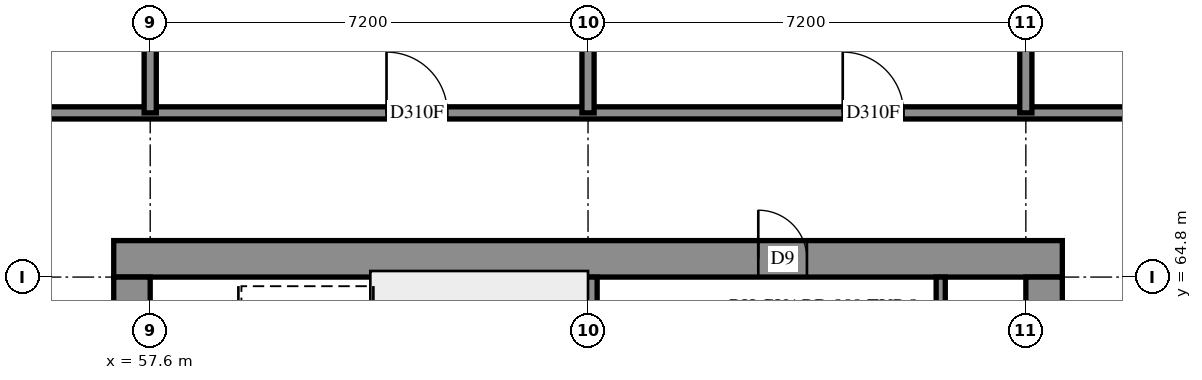
"""IFC4 building model, lengths in metres.
Left out: names, types, materials, properties, quantities, classifications, styles, units other than length and angle.
Written with IfcOpenShell. Run it as: python <this file> out.ifc"""

import sys

from ifc_helpers import new_model, si_unit, direction, frame, frame_2d, origin, place, context, subcontext, project, spatial, rectangle, extrude, element, fill, save


model = new_model("IFC4")
c1 = context("Model", 3, precision=1e-05, world=origin(), true_north=direction((0.0, 1.0)))
c2 = subcontext(c1, "Body", "Model", "MODEL_VIEW")
j1 = project(units=[si_unit("LENGTHUNIT", "METRE"), si_unit("PLANEANGLEUNIT", "RADIAN")], contexts=[c1])
p1 = place(None, origin())
s1 = spatial("IfcSite", under=j1, at=p1, CompositionType="ELEMENT")
p2 = place(p1, origin())
s2 = spatial("IfcBuilding", under=s1, at=p2, CompositionType="ELEMENT")
p3 = place(p2, frame((0.0, 0.0, 142.2)))
s3 = spatial("IfcBuildingStorey", under=s2, at=p3, CompositionType="ELEMENT", Elevation=142.2)
p4 = place(p3, frame((57.0, 65.1, -0.3), z_axis=(0.0, 0.0, 1.0), x_axis=(1.0, 0.0, 0.0)))
e1 = element("IfcWall", 1, at=p4, inside=s3, PredefinedType="SHEAR", context=c2, shape_type="SweptSolid", body=[
    extrude(rectangle(XDim=15.6, YDim=0.6, at=frame_2d((7.8, 0.0))), origin(), (0.0, 0.0, 1.0), 2.7),
])
p5 = place(p4, frame((10.6, 0.0, 0.3)))
e2 = element("IfcOpeningElement", 2, at=p5, cuts=e1, PredefinedType="OPENING", context=c2, shape_type="SweptSolid", body=[
    extrude(rectangle(XDim=0.8, YDim=2.1, at=frame_2d((0.4, 1.05))), frame((0.0, 0.31, 0.0), z_axis=(0.0, -1.0, 0.0), x_axis=(1.0, 0.0, 0.0)), (0.0, 0.0, 1.0), 0.62),
])
p6 = place(p3, frame((57.3, 50.4, -0.3), z_axis=(0.0, 0.0, 1.0), x_axis=(0.0, 1.0, 0.0)))
e3 = element("IfcWall", 3, at=p6, inside=s3, PredefinedType="SHEAR", context=c2, shape_type="SweptSolid", body=[
    extrude(rectangle(XDim=14.4, YDim=0.6, at=frame_2d((7.2, 0.0))), origin(), (0.0, 0.0, 1.0), 2.7),
])
p7 = place(p6, frame((4.55, 0.0, 0.3)))
e4 = element("IfcOpeningElement", 4, at=p7, cuts=e3, PredefinedType="OPENING", context=c2, shape_type="SweptSolid", body=[
    extrude(rectangle(XDim=1.1, YDim=2.1, at=frame_2d((0.55, 1.05))), frame((0.0, 0.31, 0.0), z_axis=(0.0, -1.0, 0.0), x_axis=(1.0, 0.0, 0.0)), (0.0, 0.0, 1.0), 0.62),
])
p8 = place(p6, frame((11.35, 0.0, 0.3)))
e5 = element("IfcOpeningElement", 5, at=p8, cuts=e3, PredefinedType="OPENING", context=c2, shape_type="SweptSolid", body=[
    extrude(rectangle(XDim=1.1, YDim=2.1, at=frame_2d((0.55, 1.05))), frame((0.0, 0.31, 0.0), z_axis=(0.0, -1.0, 0.0), x_axis=(1.0, 0.0, 0.0)), (0.0, 0.0, 1.0), 0.62),
])
p9 = place(p3, frame((72.3, 50.4, -0.3), z_axis=(0.0, 0.0, 1.0), x_axis=(0.0, 1.0, 0.0)))
e6 = element("IfcWall", 6, at=p9, inside=s3, PredefinedType="SHEAR", context=c2, shape_type="SweptSolid", body=[
    extrude(rectangle(XDim=14.4, YDim=0.6, at=frame_2d((7.2, 0.0))), origin(), (0.0, 0.0, 1.0), 2.7),
])
p10 = place(p9, frame((4.55, 0.0, 0.3)))
e7 = element("IfcOpeningElement", 7, at=p10, cuts=e6, PredefinedType="OPENING", context=c2, shape_type="SweptSolid", body=[
    extrude(rectangle(XDim=1.1, YDim=2.1, at=frame_2d((0.55, 1.05))), frame((0.0, 0.31, 0.0), z_axis=(0.0, -1.0, 0.0), x_axis=(1.0, 0.0, 0.0)), (0.0, 0.0, 1.0), 0.62),
])
p11 = place(p9, frame((11.35, 0.0, 0.3)))
e8 = element("IfcOpeningElement", 8, at=p11, cuts=e6, PredefinedType="OPENING", context=c2, shape_type="SweptSolid", body=[
    extrude(rectangle(XDim=1.1, YDim=2.1, at=frame_2d((0.55, 1.05))), frame((0.0, 0.31, 0.0), z_axis=(0.0, -1.0, 0.0), x_axis=(1.0, 0.0, 0.0)), (0.0, 0.0, 1.0), 0.62),
])
p12 = place(p3, frame((64.8, 60.6, 0.0), z_axis=(0.0, 0.0, 1.0), x_axis=(0.0, 1.0, 0.0)))
e9 = element("IfcWall", 9, at=p12, inside=s3, PredefinedType="SOLIDWALL", context=c2, shape_type="SweptSolid", body=[
    extrude(rectangle(XDim=4.2, YDim=0.3, at=frame_2d((2.1, 0.0))), origin(), (0.0, 0.0, 1.0), 3.1),
])
p13 = place(p3, frame((70.6, 63.78, 0.0), z_axis=(0.0, 0.0, 1.0), x_axis=(0.0, 1.0, 0.0)))
e10 = element("IfcWall", 10, at=p13, inside=s3, PredefinedType="PARTITIONING", context=c2, shape_type="SweptSolid", body=[
    extrude(rectangle(XDim=1.02, YDim=0.15, at=frame_2d((0.51, 0.0))), origin(), (0.0, 0.0, 1.0), 3.1),
])
p14 = place(p3, frame((54.9, 67.5, 0.0), z_axis=(0.0, 0.0, 1.0), x_axis=(1.0, 0.0, 0.0)))
e11 = element("IfcWall", 11, at=p14, inside=s3, PredefinedType="PARTITIONING", context=c2, shape_type="SweptSolid", body=[
    extrude(rectangle(XDim=19.8, YDim=0.2, at=frame_2d((9.9, 0.0))), origin(), (0.0, 0.0, 1.0), 3.1),
])
p15 = place(p14, frame((6.586, 0.0, 0.0)))
e12 = element("IfcOpeningElement", 12, at=p15, cuts=e11, PredefinedType="OPENING", context=c2, shape_type="SweptSolid", body=[
    extrude(rectangle(XDim=1.0, YDim=2.1, at=frame_2d((0.5, 1.05))), frame((0.0, 0.11, 0.0), z_axis=(0.0, -1.0, 0.0), x_axis=(1.0, 0.0, 0.0)), (0.0, 0.0, 1.0), 0.22),
])
p16 = place(p14, frame((14.089, 0.0, 0.0)))
e13 = element("IfcOpeningElement", 13, at=p16, cuts=e11, PredefinedType="OPENING", context=c2, shape_type="SweptSolid", body=[
    extrude(rectangle(XDim=1.0, YDim=2.1, at=frame_2d((0.5, 1.05))), frame((0.0, 0.11, 0.0), z_axis=(0.0, -1.0, 0.0), x_axis=(1.0, 0.0, 0.0)), (0.0, 0.0, 1.0), 0.22),
])
for number, where, z_axis, x_axis in (
    (14, (57.6, 67.5, 0.0), (0.0, 0.0, 1.0), (0.0, 1.0, 0.0)),
    (15, (64.8, 67.5, 0.0), (0.0, 0.0, 1.0), (0.0, 1.0, 0.0)),
):
    element("IfcWall", number, at=place(p3, frame(where, z_axis=z_axis, x_axis=x_axis)), inside=s3, PredefinedType="PARTITIONING", context=c2, shape_type="SweptSolid", body=[
        extrude(rectangle(XDim=4.05, YDim=0.2, at=frame_2d((2.025, 0.0))), origin(), (0.0, 0.0, 1.0), 3.1),
    ])
p17 = place(p3, frame((72.0, 67.5, 0.0), z_axis=(0.0, 0.0, 1.0), x_axis=(0.0, 1.0, 0.0)))
e16 = element("IfcWall", 16, at=p17, inside=s3, PredefinedType="PARTITIONING", context=c2, shape_type="SweptSolid", body=[
    extrude(rectangle(XDim=3.946, YDim=0.2, at=frame_2d((1.973, 0.0))), origin(), (0.0, 0.0, 1.0), 3.1),
])
p18 = place(p5, origin())
e17 = element("IfcDoor", 17, at=p18, inside=s3, OperationType="SINGLE_SWING_RIGHT", PredefinedType="DOOR", context=c2, shape_type="SweptSolid", body=[
    extrude(rectangle(XDim=0.8, YDim=2.1, at=frame_2d((0.4, 1.05))), frame((0.0, 0.025, 0.0), z_axis=(0.0, -1.0, 0.0), x_axis=(1.0, 0.0, 0.0)), (0.0, 0.0, 1.0), 0.05),
])
fill(e2, e17)
p19 = place(p15, origin())
e18 = element("IfcDoor", 18, at=p19, inside=s3, OperationType="SINGLE_SWING_RIGHT", PredefinedType="DOOR", context=c2, shape_type="SweptSolid", body=[
    extrude(rectangle(XDim=1.0, YDim=2.1, at=frame_2d((0.5, 1.05))), frame((0.0, 0.025, 0.0), z_axis=(0.0, -1.0, 0.0), x_axis=(1.0, 0.0, 0.0)), (0.0, 0.0, 1.0), 0.05),
])
fill(e12, e18)
p20 = place(p16, origin())
e19 = element("IfcDoor", 19, at=p20, inside=s3, OperationType="SINGLE_SWING_RIGHT", PredefinedType="DOOR", context=c2, shape_type="SweptSolid", body=[
    extrude(rectangle(XDim=1.0, YDim=2.1, at=frame_2d((0.5, 1.05))), frame((0.0, 0.025, 0.0), z_axis=(0.0, -1.0, 0.0), x_axis=(1.0, 0.0, 0.0)), (0.0, 0.0, 1.0), 0.05),
])
fill(e13, e19)
save(model, sys.argv[1])
